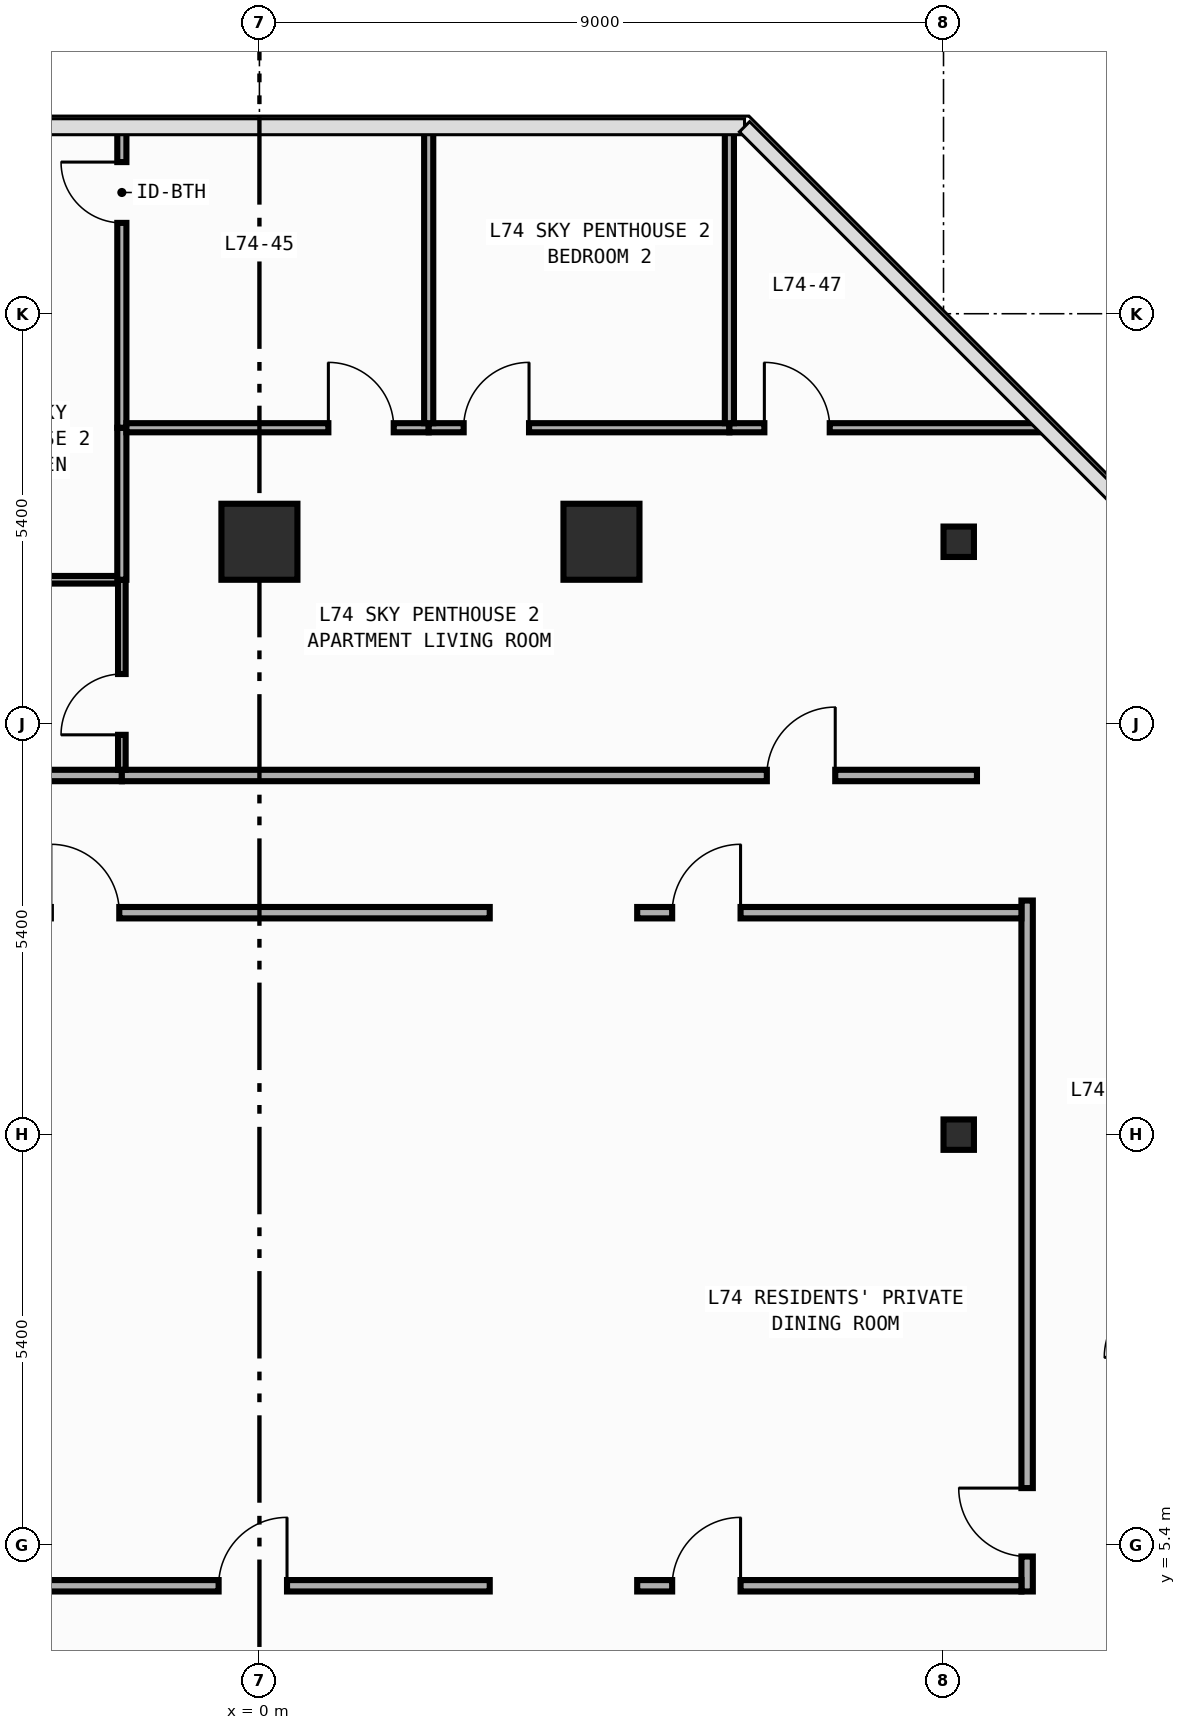
"""IFC4 building model, lengths in metres.
Left out: names, types, materials, properties, quantities, classifications, styles, units other than length and angle.
Written with IfcOpenShell. Run it as: python <this file> out.ifc"""

import sys

from ifc_helpers import new_model, si_unit, direction, frame, frame_2d, origin, origin_2d, place, context, subcontext, project, spatial, rectangle, circle, i_section, extrude, element, fill, save


model = new_model("IFC4")
c1 = context("Model", 3, precision=1e-05, world=origin(), true_north=direction((0.0, 1.0)))
c2 = subcontext(c1, "Body", "Model", "MODEL_VIEW")
j1 = project(units=[si_unit("LENGTHUNIT", "METRE"), si_unit("PLANEANGLEUNIT", "RADIAN")], contexts=[c1])
p1 = place(None, origin())
s1 = spatial("IfcSite", under=j1, at=p1, CompositionType="ELEMENT")
p2 = place(p1, origin())
s2 = spatial("IfcBuilding", under=s1, at=p2, CompositionType="ELEMENT")
p3 = place(p2, frame((0.0, 0.0, 308.0)))
s3 = spatial("IfcBuildingStorey", under=s2, at=p3, CompositionType="ELEMENT", Elevation=308.0)
for number, where, z_axis, x_axis in (
    (1, (9.2, 10.8, 0.0), (0.0, 0.0, 1.0), (1.0, 0.0, 0.0)),
    (2, (9.2, 18.6, 0.0), (0.0, 0.0, 1.0), (1.0, 0.0, 0.0)),
):
    element("IfcColumn", number, at=place(p3, frame(where, z_axis=z_axis, x_axis=x_axis)), inside=s3, PredefinedType="COLUMN", context=c2, shape_type="SweptSolid", body=[
        extrude(i_section(OverallWidth=0.4, OverallDepth=0.4, WebThickness=0.013, FlangeThickness=0.021, FilletRadius=0.022, at=origin_2d()), origin(), (0.0, 0.0, 1.0), 3.8),
    ])
for number, where, z_axis, x_axis in (
    (3, (0.0, 18.6, 0.0), (0.0, 0.0, 1.0), (1.0, 0.0, 0.0)),
    (4, (4.5, 18.6, 0.0), (0.0, 0.0, 1.0), (1.0, 0.0, 0.0)),
):
    element("IfcColumn", number, at=place(p3, frame(where, z_axis=z_axis, x_axis=x_axis)), inside=s3, PredefinedType="COLUMN", context=c2, shape_type="SweptSolid", body=[
        extrude(circle(Radius=0.5, at=origin_2d()), origin(), (0.0, 0.0, 1.0), 3.8),
    ])
p4 = place(p3, frame((10.1, 4.79, 0.0), z_axis=(0.0, 0.0, 1.0), x_axis=(0.0, 1.0, 0.0)))
e5 = element("IfcWall", 5, at=p4, inside=s3, PredefinedType="PARTITIONING", context=c2, shape_type="SweptSolid", body=[
    extrude(rectangle(XDim=9.09, YDim=0.15, at=frame_2d((4.545, 0.0))), origin(), (0.0, 0.0, 1.0), 3.54),
])
p5 = place(p4, frame((0.46, 0.0, 0.0)))
e6 = element("IfcOpeningElement", 6, at=p5, cuts=e5, PredefinedType="OPENING", context=c2, shape_type="SweptSolid", body=[
    extrude(rectangle(XDim=0.9, YDim=2.15, at=frame_2d((0.45, 1.075))), frame((0.0, 0.085, 0.0), z_axis=(0.0, -1.0, 0.0), x_axis=(1.0, 0.0, 0.0)), (0.0, 0.0, 1.0), 0.17),
])
p6 = place(p3, frame((-10.025, 4.865, 0.0), z_axis=(0.0, 0.0, 1.0), x_axis=(1.0, 0.0, 0.0)))
e7 = element("IfcWall", 7, at=p6, inside=s3, PredefinedType="PARTITIONING", context=c2, shape_type="SweptSolid", body=[
    extrude(rectangle(XDim=13.055, YDim=0.15, at=frame_2d((6.527, 0.0))), origin(), (0.0, 0.0, 1.0), 3.54),
])
p7 = place(p6, frame((9.488, 0.0, 0.0)))
e8 = element("IfcOpeningElement", 8, at=p7, cuts=e7, PredefinedType="OPENING", context=c2, shape_type="SweptSolid", body=[
    extrude(rectangle(XDim=0.9, YDim=2.15, at=frame_2d((0.45, 1.075))), frame((0.0, 0.085, 0.0), z_axis=(0.0, -1.0, 0.0), x_axis=(1.0, 0.0, 0.0)), (0.0, 0.0, 1.0), 0.17),
])
p8 = place(p3, frame((4.97, 4.865, 0.0), z_axis=(0.0, 0.0, 1.0), x_axis=(1.0, 0.0, 0.0)))
e9 = element("IfcWall", 9, at=p8, inside=s3, PredefinedType="PARTITIONING", context=c2, shape_type="SweptSolid", body=[
    extrude(rectangle(XDim=5.055, YDim=0.15, at=frame_2d((2.527, 0.0))), origin(), (0.0, 0.0, 1.0), 3.54),
])
p9 = place(p8, frame((0.46, 0.0, 0.0)))
e10 = element("IfcOpeningElement", 10, at=p9, cuts=e9, PredefinedType="OPENING", context=c2, shape_type="SweptSolid", body=[
    extrude(rectangle(XDim=0.9, YDim=2.15, at=frame_2d((0.45, 1.075))), frame((0.0, 0.085, 0.0), z_axis=(0.0, -1.0, 0.0), x_axis=(1.0, 0.0, 0.0)), (0.0, 0.0, 1.0), 0.17),
])
p10 = place(p3, frame((-4.4, 15.525, 0.0), z_axis=(0.0, 0.0, 1.0), x_axis=(1.0, 0.0, 0.0)))
e11 = element("IfcWall", 11, at=p10, inside=s3, PredefinedType="PARTITIONING", context=c2, shape_type="SweptSolid", body=[
    extrude(rectangle(XDim=2.59, YDim=0.15, at=frame_2d((1.295, 0.0))), origin(), (0.0, 0.0, 1.0), 3.54),
])
p11 = place(p3, frame((-1.81, 15.525, 0.0), z_axis=(0.0, 0.0, 1.0), x_axis=(1.0, 0.0, 0.0)))
e12 = element("IfcWall", 12, at=p11, inside=s3, PredefinedType="PARTITIONING", context=c2, shape_type="SweptSolid", body=[
    extrude(rectangle(XDim=11.25, YDim=0.15, at=frame_2d((5.625, 0.0))), origin(), (0.0, 0.0, 1.0), 3.54),
])
p12 = place(p11, frame((8.486, 0.0, 0.0)))
e13 = element("IfcOpeningElement", 13, at=p12, cuts=e12, PredefinedType="OPENING", context=c2, shape_type="SweptSolid", body=[
    extrude(rectangle(XDim=0.9, YDim=2.15, at=frame_2d((0.45, 1.075))), frame((0.0, 0.085, 0.0), z_axis=(0.0, -1.0, 0.0), x_axis=(1.0, 0.0, 0.0)), (0.0, 0.0, 1.0), 0.17),
])
p13 = place(p3, frame((-10.025, 13.72, 0.0), z_axis=(0.0, 0.0, 1.0), x_axis=(1.0, 0.0, 0.0)))
e14 = element("IfcWall", 14, at=p13, inside=s3, PredefinedType="PARTITIONING", context=c2, shape_type="SweptSolid", body=[
    extrude(rectangle(XDim=13.055, YDim=0.15, at=frame_2d((6.527, 0.0))), origin(), (0.0, 0.0, 1.0), 3.54),
])
p14 = place(p13, frame((7.281, 0.0, 0.0)))
e15 = element("IfcOpeningElement", 15, at=p14, cuts=e14, PredefinedType="OPENING", context=c2, shape_type="SweptSolid", body=[
    extrude(rectangle(XDim=0.9, YDim=2.15, at=frame_2d((0.45, 1.075))), frame((0.0, 0.085, 0.0), z_axis=(0.0, -1.0, 0.0), x_axis=(1.0, 0.0, 0.0)), (0.0, 0.0, 1.0), 0.17),
])
p15 = place(p3, frame((4.97, 13.72, 0.0), z_axis=(0.0, 0.0, 1.0), x_axis=(1.0, 0.0, 0.0)))
e16 = element("IfcWall", 16, at=p15, inside=s3, PredefinedType="PARTITIONING", context=c2, shape_type="SweptSolid", body=[
    extrude(rectangle(XDim=5.055, YDim=0.15, at=frame_2d((2.527, 0.0))), origin(), (0.0, 0.0, 1.0), 3.54),
])
p16 = place(p15, frame((0.46, 0.0, 0.0)))
e17 = element("IfcOpeningElement", 17, at=p16, cuts=e16, PredefinedType="OPENING", context=c2, shape_type="SweptSolid", body=[
    extrude(rectangle(XDim=0.9, YDim=2.15, at=frame_2d((0.45, 1.075))), frame((0.0, 0.085, 0.0), z_axis=(0.0, -1.0, 0.0), x_axis=(1.0, 0.0, 0.0)), (0.0, 0.0, 1.0), 0.17),
])
p17 = place(p3, frame((-4.33, 18.1, 0.0), z_axis=(0.0, 0.0, 1.0), x_axis=(1.0, 0.0, 0.0)))
e18 = element("IfcWall", 18, at=p17, inside=s3, PredefinedType="PARTITIONING", context=c2, shape_type="SweptSolid", body=[
    extrude(rectangle(XDim=2.47, YDim=0.1, at=frame_2d((1.235, 0.0))), origin(), (0.0, 0.0, 1.0), 3.54),
])
p18 = place(p3, frame((-1.81, 15.6, 0.0), z_axis=(0.0, 0.0, 1.0), x_axis=(0.0, 1.0, 0.0)))
e19 = element("IfcWall", 19, at=p18, inside=s3, PredefinedType="PARTITIONING", context=c2, shape_type="SweptSolid", body=[
    extrude(rectangle(XDim=2.5, YDim=0.1, at=frame_2d((1.25, 0.0))), origin(), (0.0, 0.0, 1.0), 3.54),
])
p19 = place(p18, frame((0.46, 0.0, 0.0)))
e20 = element("IfcOpeningElement", 20, at=p19, cuts=e19, PredefinedType="OPENING", context=c2, shape_type="SweptSolid", body=[
    extrude(rectangle(XDim=0.8, YDim=2.1, at=frame_2d((0.4, 1.05))), frame((0.0, 0.06, 0.0), z_axis=(0.0, -1.0, 0.0), x_axis=(1.0, 0.0, 0.0)), (0.0, 0.0, 1.0), 0.12),
])
p20 = place(p3, frame((-1.81, 18.1, 0.0), z_axis=(0.0, 0.0, 1.0), x_axis=(0.0, 1.0, 0.0)))
e21 = element("IfcWall", 21, at=p20, inside=s3, PredefinedType="PARTITIONING", context=c2, shape_type="SweptSolid", body=[
    extrude(rectangle(XDim=2.0, YDim=0.12, at=frame_2d((1.0, 0.0))), origin(), (0.0, 0.0, 1.0), 3.54),
])
p21 = place(p3, frame((-1.81, 20.1, 0.0), z_axis=(0.0, 0.0, 1.0), x_axis=(0.0, 1.0, 0.0)))
e22 = element("IfcWall", 22, at=p21, inside=s3, PredefinedType="PARTITIONING", context=c2, shape_type="SweptSolid", body=[
    extrude(rectangle(XDim=3.955, YDim=0.12, at=frame_2d((1.978, 0.0))), origin(), (0.0, 0.0, 1.0), 3.54),
])
p22 = place(p21, frame((2.695, 0.0, 0.0)))
e23 = element("IfcOpeningElement", 23, at=p22, cuts=e22, PredefinedType="OPENING", context=c2, shape_type="SweptSolid", body=[
    extrude(rectangle(XDim=0.8, YDim=2.1, at=frame_2d((0.4, 1.05))), frame((0.0, 0.07, 0.0), z_axis=(0.0, -1.0, 0.0), x_axis=(1.0, 0.0, 0.0)), (0.0, 0.0, 1.0), 0.14),
])
p23 = place(p3, frame((-1.75, 20.1, 0.0), z_axis=(0.0, 0.0, 1.0), x_axis=(1.0, 0.0, 0.0)))
e24 = element("IfcWall", 24, at=p23, inside=s3, PredefinedType="PARTITIONING", context=c2, shape_type="SweptSolid", body=[
    extrude(rectangle(XDim=3.977, YDim=0.12, at=frame_2d((1.989, 0.0))), origin(), (0.0, 0.0, 1.0), 3.54),
])
p24 = place(p23, frame((2.657, 0.0, 0.0)))
e25 = element("IfcOpeningElement", 25, at=p24, cuts=e24, PredefinedType="OPENING", context=c2, shape_type="SweptSolid", body=[
    extrude(rectangle(XDim=0.86, YDim=2.15, at=frame_2d((0.43, 1.075))), frame((0.0, 0.07, 0.0), z_axis=(0.0, -1.0, 0.0), x_axis=(1.0, 0.0, 0.0)), (0.0, 0.0, 1.0), 0.14),
])
p25 = place(p3, frame((2.227, 20.1, 0.0), z_axis=(0.0, 0.0, 1.0), x_axis=(1.0, 0.0, 0.0)))
e26 = element("IfcWall", 26, at=p25, inside=s3, PredefinedType="PARTITIONING", context=c2, shape_type="SweptSolid", body=[
    extrude(rectangle(XDim=3.956, YDim=0.12, at=frame_2d((1.978, 0.0))), origin(), (0.0, 0.0, 1.0), 3.54),
])
p26 = place(p25, frame((0.46, 0.0, 0.0)))
e27 = element("IfcOpeningElement", 27, at=p26, cuts=e26, PredefinedType="OPENING", context=c2, shape_type="SweptSolid", body=[
    extrude(rectangle(XDim=0.86, YDim=2.15, at=frame_2d((0.43, 1.075))), frame((0.0, 0.07, 0.0), z_axis=(0.0, -1.0, 0.0), x_axis=(1.0, 0.0, 0.0)), (0.0, 0.0, 1.0), 0.14),
])
p27 = place(p3, frame((6.183, 20.1, 0.0), z_axis=(0.0, 0.0, 1.0), x_axis=(1.0, 0.0, 0.0)))
e28 = element("IfcWall", 28, at=p27, inside=s3, PredefinedType="PARTITIONING", context=c2, shape_type="SweptSolid", body=[
    extrude(rectangle(XDim=4.154, YDim=0.12, at=frame_2d((2.077, 0.0))), origin(), (0.0, 0.0, 1.0), 3.54),
])
p28 = place(p27, frame((0.46, 0.0, 0.0)))
e29 = element("IfcOpeningElement", 29, at=p28, cuts=e28, PredefinedType="OPENING", context=c2, shape_type="SweptSolid", body=[
    extrude(rectangle(XDim=0.86, YDim=2.15, at=frame_2d((0.43, 1.075))), frame((0.0, 0.07, 0.0), z_axis=(0.0, -1.0, 0.0), x_axis=(1.0, 0.0, 0.0)), (0.0, 0.0, 1.0), 0.14),
])
for number, where, z_axis, x_axis in (
    (30, (2.227, 20.16, 0.0), (0.0, 0.0, 1.0), (0.0, 1.0, 0.0)),
    (31, (6.183, 20.16, 0.0), (0.0, 0.0, 1.0), (0.0, 1.0, 0.0)),
):
    element("IfcWall", number, at=place(p3, frame(where, z_axis=z_axis, x_axis=x_axis)), inside=s3, PredefinedType="PARTITIONING", context=c2, shape_type="SweptSolid", body=[
        extrude(rectangle(XDim=3.895, YDim=0.12, at=frame_2d((1.948, 0.0))), origin(), (0.0, 0.0, 1.0), 3.54),
    ])
p29 = place(p5, origin())
e32 = element("IfcDoor", 32, at=p29, inside=s3, OperationType="SINGLE_SWING_RIGHT", PredefinedType="DOOR", context=c2, shape_type="SweptSolid", body=[
    extrude(rectangle(XDim=0.9, YDim=2.15, at=frame_2d((0.45, 1.075))), frame((0.0, 0.025, 0.0), z_axis=(0.0, -1.0, 0.0), x_axis=(1.0, 0.0, 0.0)), (0.0, 0.0, 1.0), 0.05),
])
fill(e6, e32)
p30 = place(p7, origin())
e33 = element("IfcDoor", 33, at=p30, inside=s3, OperationType="SINGLE_SWING_RIGHT", PredefinedType="DOOR", context=c2, shape_type="SweptSolid", body=[
    extrude(rectangle(XDim=0.9, YDim=2.15, at=frame_2d((0.45, 1.075))), frame((0.0, 0.025, 0.0), z_axis=(0.0, -1.0, 0.0), x_axis=(1.0, 0.0, 0.0)), (0.0, 0.0, 1.0), 0.05),
])
fill(e8, e33)
p31 = place(p9, origin())
e34 = element("IfcDoor", 34, at=p31, inside=s3, OperationType="SINGLE_SWING_RIGHT", PredefinedType="DOOR", context=c2, shape_type="SweptSolid", body=[
    extrude(rectangle(XDim=0.9, YDim=2.15, at=frame_2d((0.45, 1.075))), frame((0.0, 0.025, 0.0), z_axis=(0.0, -1.0, 0.0), x_axis=(1.0, 0.0, 0.0)), (0.0, 0.0, 1.0), 0.05),
])
fill(e10, e34)
p32 = place(p12, origin())
e35 = element("IfcDoor", 35, at=p32, inside=s3, OperationType="SINGLE_SWING_RIGHT", PredefinedType="DOOR", context=c2, shape_type="SweptSolid", body=[
    extrude(rectangle(XDim=0.9, YDim=2.15, at=frame_2d((0.45, 1.075))), frame((0.0, 0.025, 0.0), z_axis=(0.0, -1.0, 0.0), x_axis=(1.0, 0.0, 0.0)), (0.0, 0.0, 1.0), 0.05),
])
fill(e13, e35)
p33 = place(p14, origin())
e36 = element("IfcDoor", 36, at=p33, inside=s3, OperationType="SINGLE_SWING_LEFT", PredefinedType="DOOR", context=c2, shape_type="SweptSolid", body=[
    extrude(rectangle(XDim=0.9, YDim=2.15, at=frame_2d((0.45, 1.075))), frame((0.0, 0.025, 0.0), z_axis=(0.0, -1.0, 0.0), x_axis=(1.0, 0.0, 0.0)), (0.0, 0.0, 1.0), 0.05),
])
fill(e15, e36)
p34 = place(p16, origin())
e37 = element("IfcDoor", 37, at=p34, inside=s3, OperationType="SINGLE_SWING_RIGHT", PredefinedType="DOOR", context=c2, shape_type="SweptSolid", body=[
    extrude(rectangle(XDim=0.9, YDim=2.15, at=frame_2d((0.45, 1.075))), frame((0.0, 0.025, 0.0), z_axis=(0.0, -1.0, 0.0), x_axis=(1.0, 0.0, 0.0)), (0.0, 0.0, 1.0), 0.05),
])
fill(e17, e37)
p35 = place(p19, origin())
e38 = element("IfcDoor", 38, at=p35, inside=s3, OperationType="SINGLE_SWING_LEFT", PredefinedType="DOOR", context=c2, shape_type="SweptSolid", body=[
    extrude(rectangle(XDim=0.8, YDim=2.1, at=frame_2d((0.4, 1.05))), frame((0.0, 0.025, 0.0), z_axis=(0.0, -1.0, 0.0), x_axis=(1.0, 0.0, 0.0)), (0.0, 0.0, 1.0), 0.05),
])
fill(e20, e38)
p36 = place(p24, origin())
e39 = element("IfcDoor", 39, at=p36, inside=s3, OperationType="SINGLE_SWING_LEFT", PredefinedType="DOOR", context=c2, shape_type="SweptSolid", body=[
    extrude(rectangle(XDim=0.86, YDim=2.15, at=frame_2d((0.43, 1.075))), frame((0.0, 0.025, 0.0), z_axis=(0.0, -1.0, 0.0), x_axis=(1.0, 0.0, 0.0)), (0.0, 0.0, 1.0), 0.05),
])
fill(e25, e39)
p37 = place(p26, origin())
e40 = element("IfcDoor", 40, at=p37, inside=s3, OperationType="SINGLE_SWING_RIGHT", PredefinedType="DOOR", context=c2, shape_type="SweptSolid", body=[
    extrude(rectangle(XDim=0.86, YDim=2.15, at=frame_2d((0.43, 1.075))), frame((0.0, 0.025, 0.0), z_axis=(0.0, -1.0, 0.0), x_axis=(1.0, 0.0, 0.0)), (0.0, 0.0, 1.0), 0.05),
])
fill(e27, e40)
p38 = place(p28, origin())
e41 = element("IfcDoor", 41, at=p38, inside=s3, OperationType="SINGLE_SWING_LEFT", PredefinedType="DOOR", context=c2, shape_type="SweptSolid", body=[
    extrude(rectangle(XDim=0.86, YDim=2.15, at=frame_2d((0.43, 1.075))), frame((0.0, 0.025, 0.0), z_axis=(0.0, -1.0, 0.0), x_axis=(1.0, 0.0, 0.0)), (0.0, 0.0, 1.0), 0.05),
])
fill(e29, e41)
p39 = place(p22, origin())
e42 = element("IfcDoor", 42, at=p39, inside=s3, OperationType="SINGLE_SWING_RIGHT", PredefinedType="DOOR", context=c2, shape_type="SweptSolid", body=[
    extrude(rectangle(XDim=0.8, YDim=2.1, at=frame_2d((0.4, 1.05))), frame((0.0, 0.025, 0.0), z_axis=(0.0, -1.0, 0.0), x_axis=(1.0, 0.0, 0.0)), (0.0, 0.0, 1.0), 0.05),
])
fill(e23, e42)
save(model, sys.argv[1])
